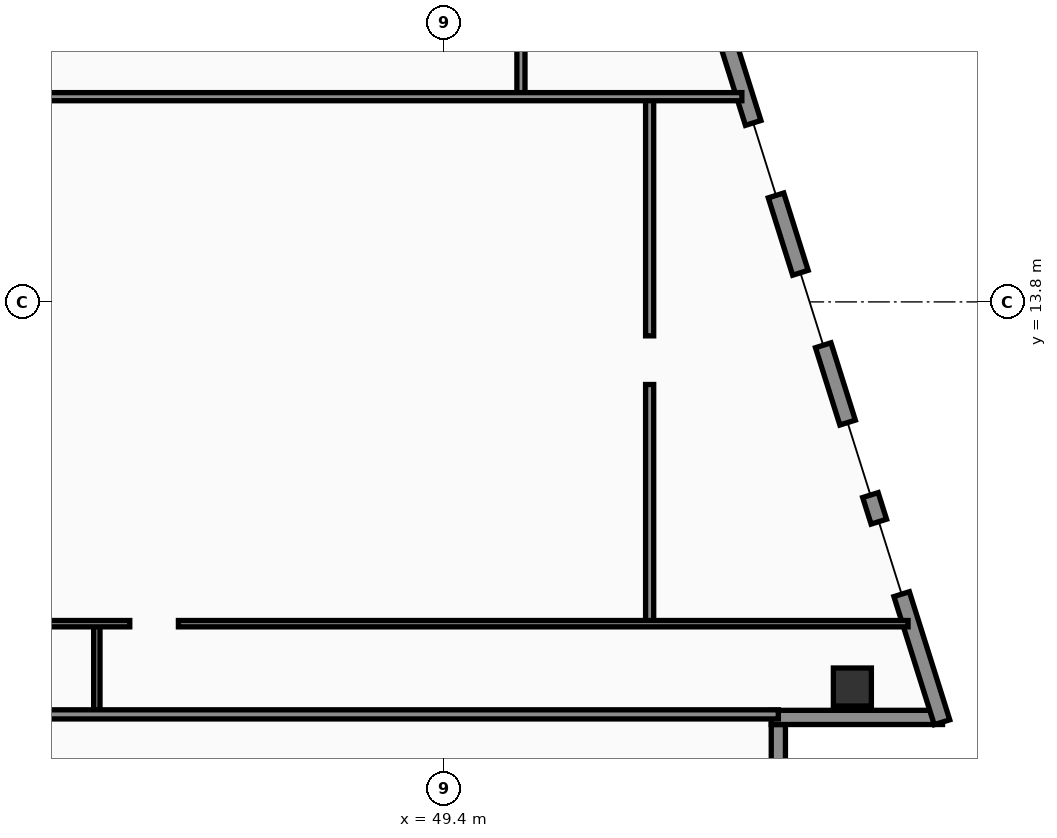
"""IFC4 building model, lengths in metres.
Left out: names, types, materials, properties, quantities, classifications, styles, units other than length and angle.
Written with IfcOpenShell. Run it as: python <this file> out.ifc"""

import sys

from ifc_helpers import new_model, si_unit, direction, frame, frame_2d, origin, origin_2d, place, context, subcontext, project, spatial, rectangle, hollow_rectangle, extrude, element, fill, save


model = new_model("IFC4")
c1 = context("Model", 3, precision=1e-05, world=origin(), true_north=direction((0.0, 1.0)))
c2 = subcontext(c1, "Body", "Model", "MODEL_VIEW")
j1 = project(units=[si_unit("LENGTHUNIT", "METRE"), si_unit("PLANEANGLEUNIT", "RADIAN")], contexts=[c1])
p1 = place(None, origin())
s1 = spatial("IfcSite", under=j1, at=p1, CompositionType="ELEMENT")
p2 = place(p1, origin())
s2 = spatial("IfcBuilding", under=s1, at=p2, CompositionType="ELEMENT")
p3 = place(p2, frame((0.0, 0.0, 116.4)))
s3 = spatial("IfcBuildingStorey", under=s2, at=p3, CompositionType="ELEMENT", Elevation=116.4)
p4 = place(p3, frame((57.461, 6.2, 0.0), z_axis=(0.0, 0.0, 1.0), x_axis=(1.0, 0.0, 0.0)))
e1 = element("IfcColumn", 1, at=p4, inside=s3, PredefinedType="COLUMN", context=c2, shape_type="SweptSolid", body=[
    extrude(hollow_rectangle(XDim=0.75, YDim=0.75, WallThickness=0.032, at=origin_2d()), origin(), (0.0, 0.0, 1.0), 3.56),
])
p5 = place(p3, frame((56.0, 2.52, 0.0), z_axis=(0.0, 0.0, 1.0), x_axis=(0.0, 1.0, 0.0)))
e2 = element("IfcWall", 2, at=p5, inside=s3, PredefinedType="SOLIDWALL", context=c2, shape_type="SweptSolid", body=[
    extrude(rectangle(XDim=2.94, YDim=0.28, at=frame_2d((1.47, 0.0))), origin(), (0.0, 0.0, 1.0), 3.04),
])
p6 = place(p3, frame((55.86, 5.6, 0.0), z_axis=(0.0, 0.0, 1.0), x_axis=(1.0, 0.0, 0.0)))
e3 = element("IfcWall", 3, at=p6, inside=s3, PredefinedType="SOLIDWALL", context=c2, shape_type="SweptSolid", body=[
    extrude(rectangle(XDim=3.38, YDim=0.28, at=frame_2d((1.69, 0.0))), origin(), (0.0, 0.0, 1.0), 3.04),
])
p7 = place(p3, frame((59.23, 5.505, 0.0), z_axis=(0.0, 0.0, 1.0), x_axis=(-0.300509063924, 0.953778958931, 0.0)))
e4 = element("IfcWall", 4, at=p7, inside=s3, PredefinedType="SOLIDWALL", context=c2, shape_type="SweptSolid", body=[
    extrude(rectangle(XDim=30.814, YDim=0.32, at=frame_2d((15.407, 0.0))), origin(), (0.0, 0.0, 1.0), 3.56),
])
p8 = place(p7, frame((18.796, 0.0, 0.0)))
e5 = element("IfcOpeningElement", 5, at=p8, cuts=e4, PredefinedType="OPENING", context=c2, shape_type="SweptSolid", body=[
    extrude(rectangle(XDim=1.4, YDim=2.25, at=frame_2d((0.7, 1.125))), frame((0.0, 0.17, 0.0), z_axis=(0.0, -1.0, 0.0), x_axis=(1.0, 0.0, 0.0)), (0.0, 0.0, 1.0), 0.34),
])
p9 = place(p7, frame((2.65, 0.0, 0.75)))
e6 = element("IfcOpeningElement", 6, at=p9, cuts=e4, PredefinedType="OPENING", context=c2, shape_type="SweptSolid", body=[
    extrude(rectangle(XDim=1.5, YDim=1.6, at=frame_2d((0.75, 0.8))), frame((0.0, 0.17, 0.0), z_axis=(0.0, -1.0, 0.0), x_axis=(1.0, 0.0, 0.0)), (0.0, 0.0, 1.0), 0.34),
])
p10 = place(p7, frame((4.7, 0.0, 0.75)))
e7 = element("IfcOpeningElement", 7, at=p10, cuts=e4, PredefinedType="OPENING", context=c2, shape_type="SweptSolid", body=[
    extrude(rectangle(XDim=1.5, YDim=1.6, at=frame_2d((0.75, 0.8))), frame((0.0, 0.17, 0.0), z_axis=(0.0, -1.0, 0.0), x_axis=(1.0, 0.0, 0.0)), (0.0, 0.0, 1.0), 0.34),
])
p11 = place(p7, frame((7.8, 0.0, 0.75)))
e8 = element("IfcOpeningElement", 8, at=p11, cuts=e4, PredefinedType="OPENING", context=c2, shape_type="SweptSolid", body=[
    extrude(rectangle(XDim=1.5, YDim=1.6, at=frame_2d((0.75, 0.8))), frame((0.0, 0.17, 0.0), z_axis=(0.0, -1.0, 0.0), x_axis=(1.0, 0.0, 0.0)), (0.0, 0.0, 1.0), 0.34),
])
p12 = place(p7, frame((10.9, 0.0, 0.75)))
e9 = element("IfcOpeningElement", 9, at=p12, cuts=e4, PredefinedType="OPENING", context=c2, shape_type="SweptSolid", body=[
    extrude(rectangle(XDim=1.5, YDim=1.6, at=frame_2d((0.75, 0.8))), frame((0.0, 0.17, 0.0), z_axis=(0.0, -1.0, 0.0), x_axis=(1.0, 0.0, 0.0)), (0.0, 0.0, 1.0), 0.34),
])
p13 = place(p7, frame((14.0, 0.0, 0.75)))
e10 = element("IfcOpeningElement", 10, at=p13, cuts=e4, PredefinedType="OPENING", context=c2, shape_type="SweptSolid", body=[
    extrude(rectangle(XDim=1.5, YDim=1.6, at=frame_2d((0.75, 0.8))), frame((0.0, 0.17, 0.0), z_axis=(0.0, -1.0, 0.0), x_axis=(1.0, 0.0, 0.0)), (0.0, 0.0, 1.0), 0.34),
])
p14 = place(p7, frame((16.55, 0.0, 0.75)))
e11 = element("IfcOpeningElement", 11, at=p14, cuts=e4, PredefinedType="OPENING", context=c2, shape_type="SweptSolid", body=[
    extrude(rectangle(XDim=1.5, YDim=1.6, at=frame_2d((0.75, 0.8))), frame((0.0, 0.17, 0.0), z_axis=(0.0, -1.0, 0.0), x_axis=(1.0, 0.0, 0.0)), (0.0, 0.0, 1.0), 0.34),
])
p15 = place(p7, frame((23.3, 0.0, 0.75)))
e12 = element("IfcOpeningElement", 12, at=p15, cuts=e4, PredefinedType="OPENING", context=c2, shape_type="SweptSolid", body=[
    extrude(rectangle(XDim=1.5, YDim=1.6, at=frame_2d((0.75, 0.8))), frame((0.0, 0.17, 0.0), z_axis=(0.0, -1.0, 0.0), x_axis=(1.0, 0.0, 0.0)), (0.0, 0.0, 1.0), 0.34),
])
p16 = place(p7, frame((27.45, 0.0, 0.75)))
e13 = element("IfcOpeningElement", 13, at=p16, cuts=e4, PredefinedType="OPENING", context=c2, shape_type="SweptSolid", body=[
    extrude(rectangle(XDim=1.5, YDim=1.6, at=frame_2d((0.75, 0.8))), frame((0.0, 0.17, 0.0), z_axis=(0.0, -1.0, 0.0), x_axis=(1.0, 0.0, 0.0)), (0.0, 0.0, 1.0), 0.34),
])
p17 = place(p3, frame((42.55, 5.66, 0.0), z_axis=(0.0, 0.0, 1.0), x_axis=(0.0, 1.0, 0.0)))
e14 = element("IfcWall", 14, at=p17, inside=s3, PredefinedType="PARTITIONING", context=c2, shape_type="SweptSolid", body=[
    extrude(rectangle(XDim=1.79, YDim=0.125, at=frame_2d((0.895, 0.0))), origin(), (0.0, 0.0, 1.0), 3.56),
])
p18 = place(p3, frame((53.46, 7.45, 0.0), z_axis=(0.0, 0.0, 1.0), x_axis=(0.0, 1.0, 0.0)))
e15 = element("IfcWall", 15, at=p18, inside=s3, PredefinedType="PARTITIONING", context=c2, shape_type="SweptSolid", body=[
    extrude(rectangle(XDim=10.4, YDim=0.16, at=frame_2d((5.2, 0.0))), origin(), (0.0, 0.0, 1.0), 3.04),
])
p19 = place(p18, frame((4.72, 0.0, 0.0)))
e16 = element("IfcOpeningElement", 16, at=p19, cuts=e15, PredefinedType="OPENING", context=c2, shape_type="SweptSolid", body=[
    extrude(rectangle(XDim=0.96, YDim=2.2, at=frame_2d((0.48, 1.1))), frame((0.0, 0.09, 0.0), z_axis=(0.0, -1.0, 0.0), x_axis=(1.0, 0.0, 0.0)), (0.0, 0.0, 1.0), 0.18),
])
p20 = place(p3, frame((39.6, 7.45, 0.0), z_axis=(0.0, 0.0, 1.0), x_axis=(1.0, 0.0, 0.0)))
e17 = element("IfcWall", 17, at=p20, inside=s3, PredefinedType="PARTITIONING", context=c2, shape_type="SweptSolid", body=[
    extrude(rectangle(XDim=18.96, YDim=0.125, at=frame_2d((9.48, 0.0))), origin(), (0.0, 0.0, 1.0), 2.84),
])
p21 = place(p20, frame((0.5, 0.0, 0.0)))
e18 = element("IfcOpeningElement", 18, at=p21, cuts=e17, PredefinedType="OPENING", context=c2, shape_type="SweptSolid", body=[
    extrude(rectangle(XDim=0.9, YDim=2.15, at=frame_2d((0.45, 1.075))), frame((0.0, 0.073, 0.0), z_axis=(0.0, -1.0, 0.0), x_axis=(1.0, 0.0, 0.0)), (0.0, 0.0, 1.0), 0.145),
])
p22 = place(p20, frame((3.6, 0.0, 0.0)))
e19 = element("IfcOpeningElement", 19, at=p22, cuts=e17, PredefinedType="OPENING", context=c2, shape_type="SweptSolid", body=[
    extrude(rectangle(XDim=0.96, YDim=2.2, at=frame_2d((0.48, 1.1))), frame((0.0, 0.073, 0.0), z_axis=(0.0, -1.0, 0.0), x_axis=(1.0, 0.0, 0.0)), (0.0, 0.0, 1.0), 0.145),
])
p23 = place(p3, frame((39.6, 5.66, 0.0), z_axis=(0.0, 0.0, 1.0), x_axis=(1.0, 0.0, 0.0)))
e20 = element("IfcWall", 20, at=p23, inside=s3, PredefinedType="PARTITIONING", context=c2, shape_type="SweptSolid", body=[
    extrude(rectangle(XDim=16.4, YDim=0.18, at=frame_2d((8.2, 0.0))), origin(), (0.0, 0.0, 1.0), 2.84),
])
p24 = place(p3, frame((50.92, 17.85, 0.0), z_axis=(0.0, 0.0, 1.0), x_axis=(0.0, 1.0, 0.0)))
e21 = element("IfcWall", 21, at=p24, inside=s3, PredefinedType="PARTITIONING", context=c2, shape_type="SweptSolid", body=[
    extrude(rectangle(XDim=5.74, YDim=0.16, at=frame_2d((2.87, 0.0))), origin(), (0.0, 0.0, 1.0), 2.84),
])
p25 = place(p24, frame((2.39, 0.0, 0.0)))
e22 = element("IfcOpeningElement", 22, at=p25, cuts=e21, PredefinedType="OPENING", context=c2, shape_type="SweptSolid", body=[
    extrude(rectangle(XDim=0.96, YDim=2.2, at=frame_2d((0.48, 1.1))), frame((0.0, 0.09, 0.0), z_axis=(0.0, -1.0, 0.0), x_axis=(1.0, 0.0, 0.0)), (0.0, 0.0, 1.0), 0.18),
])
p26 = place(p3, frame((39.6, 17.85, 0.0), z_axis=(0.0, 0.0, 1.0), x_axis=(1.0, 0.0, 0.0)))
e23 = element("IfcWall", 23, at=p26, inside=s3, PredefinedType="PARTITIONING", context=c2, shape_type="SweptSolid", body=[
    extrude(rectangle(XDim=15.68, YDim=0.16, at=frame_2d((7.84, 0.0))), origin(), (0.0, 0.0, 1.0), 2.84),
])
p27 = place(p9, origin())
e24 = element("IfcWindow", 24, at=p27, inside=s3, PartitioningType="SINGLE_PANEL", PredefinedType="WINDOW", context=c2, shape_type="SweptSolid", body=[
    extrude(rectangle(XDim=1.5, YDim=1.6, at=frame_2d((0.75, 0.8))), frame((0.0, 0.03, 0.0), z_axis=(0.0, -1.0, 0.0), x_axis=(1.0, 0.0, 0.0)), (0.0, 0.0, 1.0), 0.06),
])
fill(e6, e24)
p28 = place(p10, origin())
e25 = element("IfcWindow", 25, at=p28, inside=s3, PartitioningType="SINGLE_PANEL", PredefinedType="WINDOW", context=c2, shape_type="SweptSolid", body=[
    extrude(rectangle(XDim=1.5, YDim=1.6, at=frame_2d((0.75, 0.8))), frame((0.0, 0.03, 0.0), z_axis=(0.0, -1.0, 0.0), x_axis=(1.0, 0.0, 0.0)), (0.0, 0.0, 1.0), 0.06),
])
fill(e7, e25)
p29 = place(p11, origin())
e26 = element("IfcWindow", 26, at=p29, inside=s3, PartitioningType="SINGLE_PANEL", PredefinedType="WINDOW", context=c2, shape_type="SweptSolid", body=[
    extrude(rectangle(XDim=1.5, YDim=1.6, at=frame_2d((0.75, 0.8))), frame((0.0, 0.03, 0.0), z_axis=(0.0, -1.0, 0.0), x_axis=(1.0, 0.0, 0.0)), (0.0, 0.0, 1.0), 0.06),
])
fill(e8, e26)
p30 = place(p12, origin())
e27 = element("IfcWindow", 27, at=p30, inside=s3, PartitioningType="SINGLE_PANEL", PredefinedType="WINDOW", context=c2, shape_type="SweptSolid", body=[
    extrude(rectangle(XDim=1.5, YDim=1.6, at=frame_2d((0.75, 0.8))), frame((0.0, 0.03, 0.0), z_axis=(0.0, -1.0, 0.0), x_axis=(1.0, 0.0, 0.0)), (0.0, 0.0, 1.0), 0.06),
])
fill(e9, e27)
p31 = place(p19, origin())
e28 = element("IfcDoor", 28, at=p31, inside=s3, OperationType="SINGLE_SWING_LEFT", PredefinedType="DOOR", context=c2, shape_type="SweptSolid", body=[
    extrude(rectangle(XDim=0.96, YDim=2.2, at=frame_2d((0.48, 1.1))), frame((0.0, 0.025, 0.0), z_axis=(0.0, -1.0, 0.0), x_axis=(1.0, 0.0, 0.0)), (0.0, 0.0, 1.0), 0.05),
])
fill(e16, e28)
p32 = place(p22, origin())
e29 = element("IfcDoor", 29, at=p32, inside=s3, OperationType="SINGLE_SWING_RIGHT", PredefinedType="DOOR", context=c2, shape_type="SweptSolid", body=[
    extrude(rectangle(XDim=0.96, YDim=2.2, at=frame_2d((0.48, 1.1))), frame((0.0, 0.025, 0.0), z_axis=(0.0, -1.0, 0.0), x_axis=(1.0, 0.0, 0.0)), (0.0, 0.0, 1.0), 0.05),
])
fill(e19, e29)
save(model, sys.argv[1])
